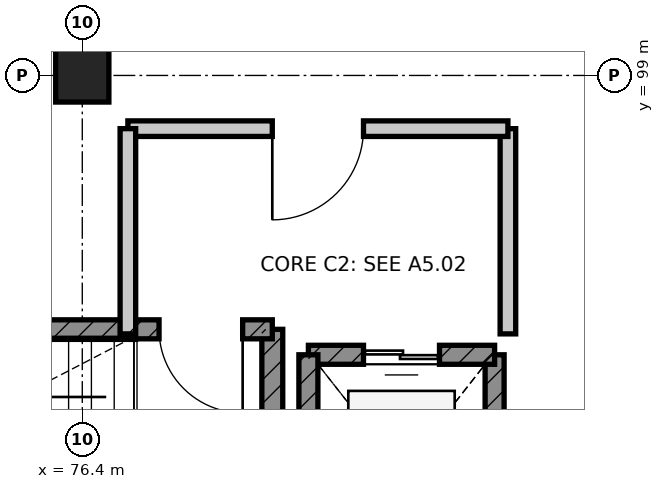
"""IFC4 building model, lengths in metres.
Left out: names, types, materials, properties, quantities, classifications, styles, units other than length and angle.
Written with IfcOpenShell. Run it as: python <this file> out.ifc"""

import sys

from ifc_helpers import new_model, si_unit, direction, frame, frame_2d, origin, origin_2d, place, context, subcontext, project, spatial, rectangle, extrude, element, fill, save


model = new_model("IFC4")
c1 = context("Model", 3, precision=1e-05, world=origin(), true_north=direction((0.0, 1.0)))
c2 = subcontext(c1, "Body", "Model", "MODEL_VIEW")
j1 = project(units=[si_unit("LENGTHUNIT", "METRE"), si_unit("PLANEANGLEUNIT", "RADIAN")], contexts=[c1])
p1 = place(None, origin())
s1 = spatial("IfcSite", under=j1, at=p1, CompositionType="ELEMENT")
p2 = place(p1, origin())
s2 = spatial("IfcBuilding", under=s1, at=p2, CompositionType="ELEMENT")
p3 = place(p2, frame((0.0, 0.0, 19.2)))
s3 = spatial("IfcBuildingStorey", under=s2, at=p3, CompositionType="ELEMENT", Elevation=19.2)
p4 = place(p3, frame((76.4, 99.0, 0.0), z_axis=(0.0, 0.0, 1.0), x_axis=(1.0, 0.0, 0.0)))
e1 = element("IfcColumn", 1, at=p4, inside=s3, PredefinedType="COLUMN", context=c2, shape_type="SweptSolid", body=[
    extrude(rectangle(XDim=0.7, YDim=0.7, at=origin_2d()), origin(), (0.0, 0.0, 1.0), 3.6),
])
p5 = place(p3, frame((78.9, 92.1, 0.0), z_axis=(0.0, 0.0, 1.0), x_axis=(0.0, 1.0, 0.0)))
e2 = element("IfcWall", 2, at=p5, inside=s3, PredefinedType="SHEAR", context=c2, shape_type="SweptSolid", body=[
    extrude(rectangle(XDim=3.56, YDim=0.275, at=frame_2d((1.78, 0.0))), origin(), (0.0, 0.0, 1.0), 3.35),
])
p6 = place(p3, frame((78.9, 95.66, 0.0), z_axis=(0.0, 0.0, 1.0), x_axis=(-1.0, 0.0, 0.0)))
e3 = element("IfcWall", 3, at=p6, inside=s3, PredefinedType="SHEAR", context=c2, shape_type="SweptSolid", body=[
    extrude(rectangle(XDim=8.4, YDim=0.25, at=frame_2d((4.2, 0.0))), origin(), (0.0, 0.0, 1.0), 3.35),
])
p7 = place(p6, frame((0.39, 0.0, 0.0)))
e4 = element("IfcOpeningElement", 4, at=p7, cuts=e3, PredefinedType="OPENING", context=c2, shape_type="SweptSolid", body=[
    extrude(rectangle(XDim=1.1, YDim=2.1, at=frame_2d((0.55, 1.05))), frame((0.0, 0.135, 0.0), z_axis=(0.0, -1.0, 0.0), x_axis=(1.0, 0.0, 0.0)), (0.0, 0.0, 1.0), 0.27),
])
p8 = place(p3, frame((81.825, 92.275, 0.0), z_axis=(0.0, 0.0, 1.0), x_axis=(0.0, 1.0, 0.0)))
e5 = element("IfcWall", 5, at=p8, inside=s3, PredefinedType="SHEAR", context=c2, shape_type="SweptSolid", body=[
    extrude(rectangle(XDim=3.05, YDim=0.25, at=frame_2d((1.525, 0.0))), origin(), (0.0, 0.0, 1.0), 3.35),
])
p9 = place(p3, frame((81.825, 95.325, 0.0), z_axis=(0.0, 0.0, 1.0), x_axis=(-1.0, 0.0, 0.0)))
e6 = element("IfcWall", 6, at=p9, inside=s3, PredefinedType="SHEAR", context=c2, shape_type="SweptSolid", body=[
    extrude(rectangle(XDim=2.45, YDim=0.25, at=frame_2d((1.225, 0.0))), origin(), (0.0, 0.0, 1.0), 3.35),
])
p10 = place(p9, frame((0.725, 0.0, 0.0)))
e7 = element("IfcOpeningElement", 7, at=p10, cuts=e6, PredefinedType="OPENING", context=c2, shape_type="SweptSolid", body=[
    extrude(rectangle(XDim=1.0, YDim=2.15, at=frame_2d((0.5, 1.075))), frame((0.0, 0.135, 0.0), z_axis=(0.0, -1.0, 0.0), x_axis=(1.0, 0.0, 0.0)), (0.0, 0.0, 1.0), 0.27),
])
p11 = place(p3, frame((79.375, 95.325, 0.0), z_axis=(0.0, 0.0, 1.0), x_axis=(0.0, -1.0, 0.0)))
e8 = element("IfcWall", 8, at=p11, inside=s3, PredefinedType="SHEAR", context=c2, shape_type="SweptSolid", body=[
    extrude(rectangle(XDim=3.05, YDim=0.25, at=frame_2d((1.525, 0.0))), origin(), (0.0, 0.0, 1.0), 3.35),
])
p12 = place(p3, frame((82.0, 95.6, 0.0), z_axis=(0.0, 0.0, 1.0), x_axis=(0.0, 1.0, 0.0)))
e9 = element("IfcWall", 9, at=p12, inside=s3, PredefinedType="PARTITIONING", context=c2, shape_type="SweptSolid", body=[
    extrude(rectangle(XDim=2.7, YDim=0.205, at=frame_2d((1.35, 0.0))), origin(), (0.0, 0.0, 1.0), 3.35),
])
p13 = place(p3, frame((82.0, 98.3, 0.0), z_axis=(0.0, 0.0, 1.0), x_axis=(-1.0, 0.0, 0.0)))
e10 = element("IfcWall", 10, at=p13, inside=s3, PredefinedType="PARTITIONING", context=c2, shape_type="SweptSolid", body=[
    extrude(rectangle(XDim=5.0, YDim=0.205, at=frame_2d((2.5, 0.0))), origin(), (0.0, 0.0, 1.0), 3.35),
])
p14 = place(p13, frame((1.9, 0.0, 0.0)))
e11 = element("IfcOpeningElement", 11, at=p14, cuts=e10, PredefinedType="OPENING", context=c2, shape_type="SweptSolid", body=[
    extrude(rectangle(XDim=1.2, YDim=2.1, at=frame_2d((0.6, 1.05))), frame((0.0, 0.113, 0.0), z_axis=(0.0, -1.0, 0.0), x_axis=(1.0, 0.0, 0.0)), (0.0, 0.0, 1.0), 0.225),
])
p15 = place(p3, frame((77.0, 98.3, 0.0), z_axis=(0.0, 0.0, 1.0), x_axis=(0.0, -1.0, 0.0)))
e12 = element("IfcWall", 12, at=p15, inside=s3, PredefinedType="PARTITIONING", context=c2, shape_type="SweptSolid", body=[
    extrude(rectangle(XDim=2.7, YDim=0.205, at=frame_2d((1.35, 0.0))), origin(), (0.0, 0.0, 1.0), 3.35),
])
p16 = place(p7, origin())
e13 = element("IfcDoor", 13, at=p16, inside=s3, OperationType="SINGLE_SWING_LEFT", PredefinedType="DOOR", context=c2, shape_type="SweptSolid", body=[
    extrude(rectangle(XDim=1.1, YDim=2.1, at=frame_2d((0.55, 1.05))), frame((0.0, 0.025, 0.0), z_axis=(0.0, -1.0, 0.0), x_axis=(1.0, 0.0, 0.0)), (0.0, 0.0, 1.0), 0.05),
])
fill(e4, e13)
p17 = place(p10, origin())
e14 = element("IfcDoor", 14, at=p17, inside=s3, OperationType="DOUBLE_DOOR_SLIDING", PredefinedType="DOOR", context=c2, shape_type="SweptSolid", body=[
    extrude(rectangle(XDim=1.0, YDim=2.15, at=frame_2d((0.5, 1.075))), frame((0.0, 0.025, 0.0), z_axis=(0.0, -1.0, 0.0), x_axis=(1.0, 0.0, 0.0)), (0.0, 0.0, 1.0), 0.05),
])
fill(e7, e14)
p18 = place(p14, origin())
e15 = element("IfcDoor", 15, at=p18, inside=s3, OperationType="SINGLE_SWING_RIGHT", PredefinedType="DOOR", context=c2, shape_type="SweptSolid", body=[
    extrude(rectangle(XDim=1.2, YDim=2.1, at=frame_2d((0.6, 1.05))), frame((0.0, 0.025, 0.0), z_axis=(0.0, -1.0, 0.0), x_axis=(1.0, 0.0, 0.0)), (0.0, 0.0, 1.0), 0.05),
])
fill(e11, e15)
save(model, sys.argv[1])
